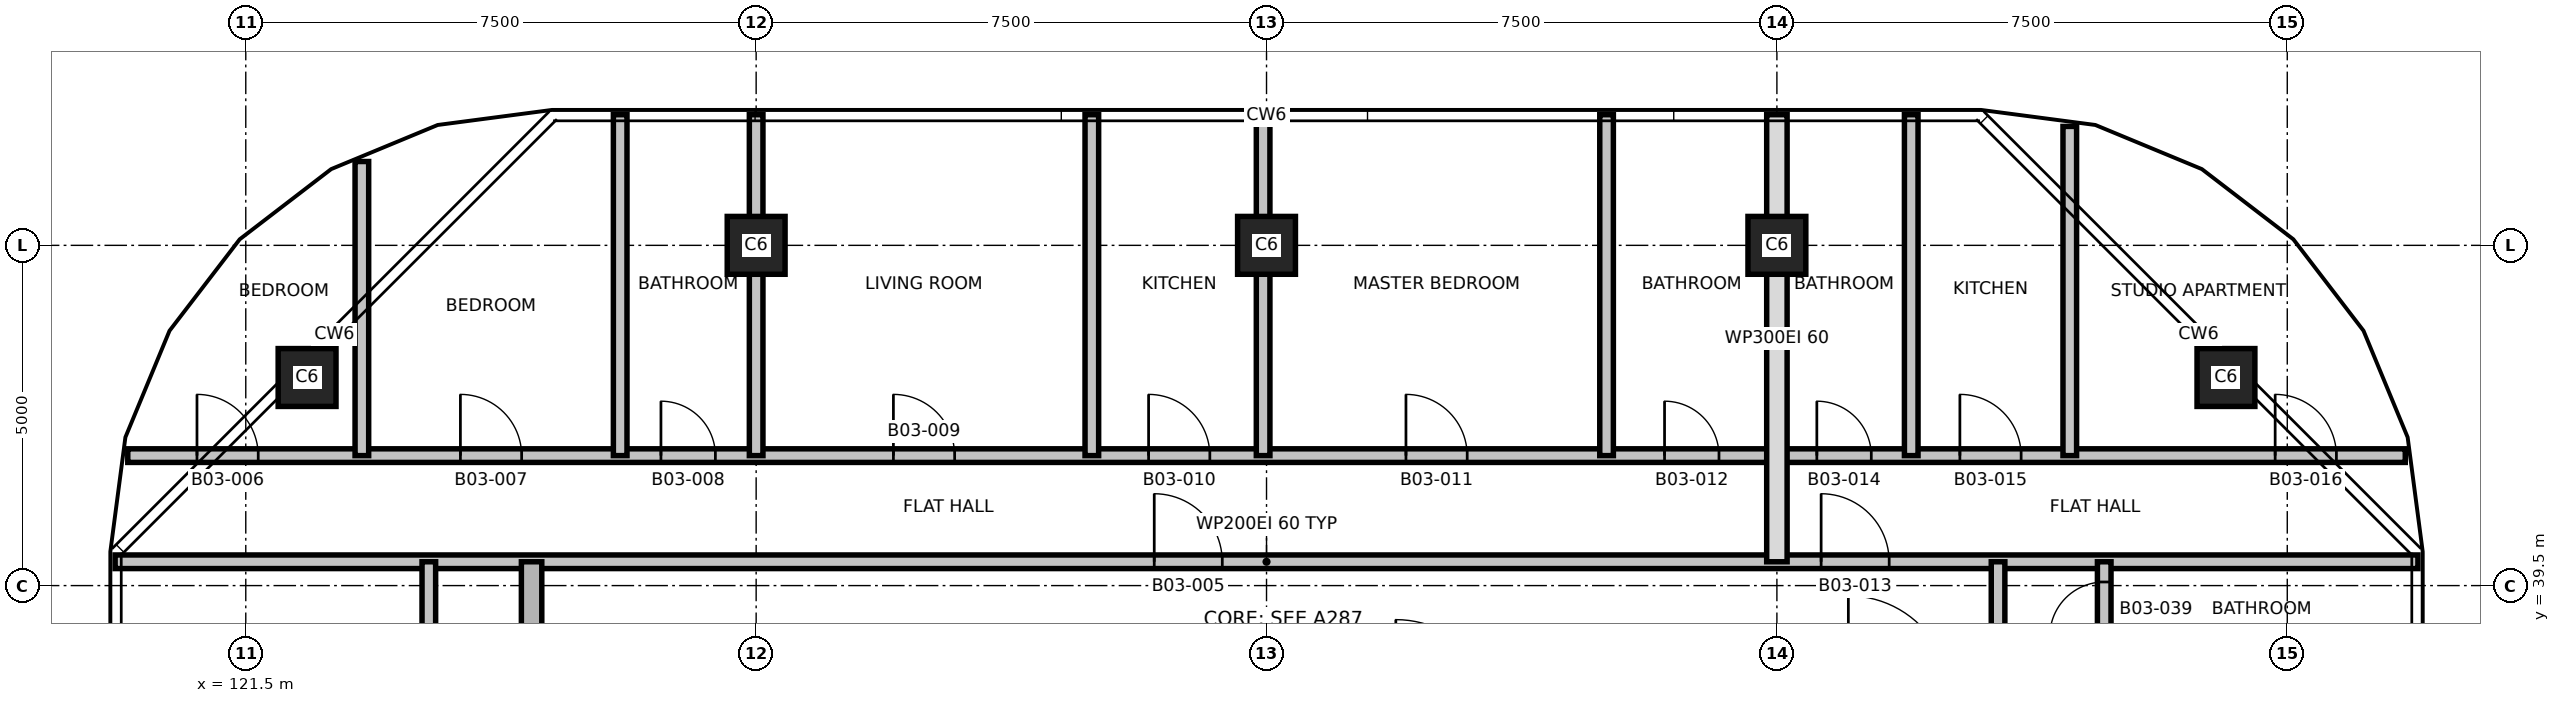
"""IFC4 building model, lengths in metres.
Left out: names, types, materials, properties, quantities, classifications, styles, units other than length and angle.
Written with IfcOpenShell. Run it as: python <this file> out.ifc"""

import sys

from ifc_helpers import new_model, si_unit, direction, frame, frame_2d, origin, origin_2d, place, context, subcontext, project, spatial, rectangle, extrude, element, fill, save


model = new_model("IFC4")
c1 = context("Model", 3, precision=1e-05, world=origin(), true_north=direction((0.0, 1.0)))
c2 = subcontext(c1, "Body", "Model", "MODEL_VIEW")
j1 = project(units=[si_unit("LENGTHUNIT", "METRE"), si_unit("PLANEANGLEUNIT", "RADIAN")], contexts=[c1])
p1 = place(None, origin())
s1 = spatial("IfcSite", under=j1, at=p1, CompositionType="ELEMENT")
p2 = place(p1, origin())
s2 = spatial("IfcBuilding", under=s1, at=p2, CompositionType="ELEMENT")
p3 = place(p2, frame((0.0, 0.0, 59.4)))
s3 = spatial("IfcBuildingStorey", under=s2, at=p3, CompositionType="ELEMENT", Elevation=59.4)
for number, where, z_axis, x_axis in (
    (1, (122.401, 42.558, 0.0), (0.0, 0.0, 1.0), (1.0, 0.0, 0.0)),
    (2, (150.599, 42.558, 0.0), (0.0, 0.0, 1.0), (1.0, 0.0, 0.0)),
    (3, (129.0, 44.5, 0.0), (0.0, 0.0, 1.0), (1.0, 0.0, 0.0)),
    (4, (136.5, 44.5, 0.0), (0.0, 0.0, 1.0), (1.0, 0.0, 0.0)),
    (5, (144.0, 44.5, 0.0), (0.0, 0.0, 1.0), (1.0, 0.0, 0.0)),
):
    element("IfcColumn", number, at=place(p3, frame(where, z_axis=z_axis, x_axis=x_axis)), inside=s3, PredefinedType="COLUMN", context=c2, shape_type="SweptSolid", body=[
        extrude(rectangle(XDim=0.85, YDim=0.85, at=origin_2d()), origin(), (0.0, 0.0, 1.0), 3.7),
    ])
p4 = place(p3, frame((119.58, 39.85, 0.0), z_axis=(0.0, 0.0, 1.0), x_axis=(1.0, 0.0, 0.0)))
e6 = element("IfcWall", 6, at=p4, inside=s3, PredefinedType="PARTITIONING", context=c2, shape_type="SweptSolid", body=[
    extrude(rectangle(XDim=33.84, YDim=0.2, at=frame_2d((16.92, 0.0))), origin(), (0.0, 0.0, 1.0), 3.4),
])
p5 = place(p4, frame((15.27, 0.0, 0.0)))
e7 = element("IfcOpeningElement", 7, at=p5, cuts=e6, PredefinedType="OPENING", context=c2, shape_type="SweptSolid", body=[
    extrude(rectangle(XDim=1.0, YDim=2.1, at=frame_2d((0.5, 1.05))), frame((0.0, 0.11, 0.0), z_axis=(0.0, -1.0, 0.0), x_axis=(1.0, 0.0, 0.0)), (0.0, 0.0, 1.0), 0.22),
])
p6 = place(p4, frame((25.07, 0.0, 0.0)))
e8 = element("IfcOpeningElement", 8, at=p6, cuts=e6, PredefinedType="OPENING", context=c2, shape_type="SweptSolid", body=[
    extrude(rectangle(XDim=1.0, YDim=2.1, at=frame_2d((0.5, 1.05))), frame((0.0, 0.11, 0.0), z_axis=(0.0, -1.0, 0.0), x_axis=(1.0, 0.0, 0.0)), (0.0, 0.0, 1.0), 0.22),
])
p7 = place(p3, frame((119.766, 41.41, 0.0), z_axis=(0.0, 0.0, 1.0), x_axis=(1.0, 0.0, 0.0)))
e9 = element("IfcWall", 9, at=p7, inside=s3, PredefinedType="PARTITIONING", context=c2, shape_type="SweptSolid", body=[
    extrude(rectangle(XDim=33.468, YDim=0.2, at=frame_2d((16.734, 0.0))), origin(), (0.0, 0.0, 1.0), 3.4),
])
p8 = place(p7, frame((1.017, 0.0, 0.0)))
e10 = element("IfcOpeningElement", 10, at=p8, cuts=e9, PredefinedType="OPENING", context=c2, shape_type="SweptSolid", body=[
    extrude(rectangle(XDim=0.9, YDim=2.1, at=frame_2d((0.45, 1.05))), frame((0.0, 0.11, 0.0), z_axis=(0.0, -1.0, 0.0), x_axis=(1.0, 0.0, 0.0)), (0.0, 0.0, 1.0), 0.22),
])
p9 = place(p7, frame((4.888, 0.0, 0.0)))
e11 = element("IfcOpeningElement", 11, at=p9, cuts=e9, PredefinedType="OPENING", context=c2, shape_type="SweptSolid", body=[
    extrude(rectangle(XDim=0.9, YDim=2.1, at=frame_2d((0.45, 1.05))), frame((0.0, 0.11, 0.0), z_axis=(0.0, -1.0, 0.0), x_axis=(1.0, 0.0, 0.0)), (0.0, 0.0, 1.0), 0.22),
])
p10 = place(p7, frame((7.835, 0.0, 0.0)))
e12 = element("IfcOpeningElement", 12, at=p10, cuts=e9, PredefinedType="OPENING", context=c2, shape_type="SweptSolid", body=[
    extrude(rectangle(XDim=0.8, YDim=2.1, at=frame_2d((0.4, 1.05))), frame((0.0, 0.11, 0.0), z_axis=(0.0, -1.0, 0.0), x_axis=(1.0, 0.0, 0.0)), (0.0, 0.0, 1.0), 0.22),
])
p11 = place(p7, frame((11.251, 0.0, 0.0)))
e13 = element("IfcOpeningElement", 13, at=p11, cuts=e9, PredefinedType="OPENING", context=c2, shape_type="SweptSolid", body=[
    extrude(rectangle(XDim=0.9, YDim=2.1, at=frame_2d((0.45, 1.05))), frame((0.0, 0.11, 0.0), z_axis=(0.0, -1.0, 0.0), x_axis=(1.0, 0.0, 0.0)), (0.0, 0.0, 1.0), 0.22),
])
p12 = place(p7, frame((15.001, 0.0, 0.0)))
e14 = element("IfcOpeningElement", 14, at=p12, cuts=e9, PredefinedType="OPENING", context=c2, shape_type="SweptSolid", body=[
    extrude(rectangle(XDim=0.9, YDim=2.1, at=frame_2d((0.45, 1.05))), frame((0.0, 0.11, 0.0), z_axis=(0.0, -1.0, 0.0), x_axis=(1.0, 0.0, 0.0)), (0.0, 0.0, 1.0), 0.22),
])
p13 = place(p7, frame((18.783, 0.0, 0.0)))
e15 = element("IfcOpeningElement", 15, at=p13, cuts=e9, PredefinedType="OPENING", context=c2, shape_type="SweptSolid", body=[
    extrude(rectangle(XDim=0.9, YDim=2.1, at=frame_2d((0.45, 1.05))), frame((0.0, 0.11, 0.0), z_axis=(0.0, -1.0, 0.0), x_axis=(1.0, 0.0, 0.0)), (0.0, 0.0, 1.0), 0.22),
])
p14 = place(p7, frame((22.583, 0.0, 0.0)))
e16 = element("IfcOpeningElement", 16, at=p14, cuts=e9, PredefinedType="OPENING", context=c2, shape_type="SweptSolid", body=[
    extrude(rectangle(XDim=0.8, YDim=2.1, at=frame_2d((0.4, 1.05))), frame((0.0, 0.11, 0.0), z_axis=(0.0, -1.0, 0.0), x_axis=(1.0, 0.0, 0.0)), (0.0, 0.0, 1.0), 0.22),
])
p15 = place(p7, frame((24.821, 0.0, 0.0)))
e17 = element("IfcOpeningElement", 17, at=p15, cuts=e9, PredefinedType="OPENING", context=c2, shape_type="SweptSolid", body=[
    extrude(rectangle(XDim=0.8, YDim=2.1, at=frame_2d((0.4, 1.05))), frame((0.0, 0.11, 0.0), z_axis=(0.0, -1.0, 0.0), x_axis=(1.0, 0.0, 0.0)), (0.0, 0.0, 1.0), 0.22),
])
p16 = place(p7, frame((26.923, 0.0, 0.0)))
e18 = element("IfcOpeningElement", 18, at=p16, cuts=e9, PredefinedType="OPENING", context=c2, shape_type="SweptSolid", body=[
    extrude(rectangle(XDim=0.9, YDim=2.1, at=frame_2d((0.45, 1.05))), frame((0.0, 0.11, 0.0), z_axis=(0.0, -1.0, 0.0), x_axis=(1.0, 0.0, 0.0)), (0.0, 0.0, 1.0), 0.22),
])
p17 = place(p7, frame((31.556, 0.0, 0.0)))
e19 = element("IfcOpeningElement", 19, at=p17, cuts=e9, PredefinedType="OPENING", context=c2, shape_type="SweptSolid", body=[
    extrude(rectangle(XDim=0.9, YDim=2.1, at=frame_2d((0.45, 1.05))), frame((0.0, 0.11, 0.0), z_axis=(0.0, -1.0, 0.0), x_axis=(1.0, 0.0, 0.0)), (0.0, 0.0, 1.0), 0.22),
])
p18 = place(p3, frame((123.206, 41.41, 0.0), z_axis=(0.0, 0.0, 1.0), x_axis=(0.0, 1.0, 0.0)))
e20 = element("IfcWall", 20, at=p18, inside=s3, PredefinedType="PARTITIONING", context=c2, shape_type="SweptSolid", body=[
    extrude(rectangle(XDim=4.322, YDim=0.2, at=frame_2d((2.161, 0.0))), origin(), (0.0, 0.0, 1.0), 3.4),
])
p19 = place(p3, frame((124.19, 22.15, 0.0), z_axis=(0.0, 0.0, 1.0), x_axis=(0.0, 1.0, 0.0)))
e21 = element("IfcWall", 21, at=p19, inside=s3, PredefinedType="PARTITIONING", context=c2, shape_type="SweptSolid", body=[
    extrude(rectangle(XDim=17.7, YDim=0.2, at=frame_2d((8.85, 0.0))), origin(), (0.0, 0.0, 1.0), 3.4),
])
p20 = place(p19, frame((1.028, 0.0, 0.0)))
e22 = element("IfcOpeningElement", 22, at=p20, cuts=e21, PredefinedType="OPENING", context=c2, shape_type="SweptSolid", body=[
    extrude(rectangle(XDim=0.9, YDim=2.1, at=frame_2d((0.45, 1.05))), frame((0.0, 0.11, 0.0), z_axis=(0.0, -1.0, 0.0), x_axis=(1.0, 0.0, 0.0)), (0.0, 0.0, 1.0), 0.22),
])
p21 = place(p19, frame((3.253, 0.0, 0.0)))
e23 = element("IfcOpeningElement", 23, at=p21, cuts=e21, PredefinedType="OPENING", context=c2, shape_type="SweptSolid", body=[
    extrude(rectangle(XDim=0.8, YDim=2.1, at=frame_2d((0.4, 1.05))), frame((0.0, 0.11, 0.0), z_axis=(0.0, -1.0, 0.0), x_axis=(1.0, 0.0, 0.0)), (0.0, 0.0, 1.0), 0.22),
])
p22 = place(p19, frame((6.867, 0.0, 0.0)))
e24 = element("IfcOpeningElement", 24, at=p22, cuts=e21, PredefinedType="OPENING", context=c2, shape_type="SweptSolid", body=[
    extrude(rectangle(XDim=0.9, YDim=2.1, at=frame_2d((0.45, 1.05))), frame((0.0, 0.11, 0.0), z_axis=(0.0, -1.0, 0.0), x_axis=(1.0, 0.0, 0.0)), (0.0, 0.0, 1.0), 0.22),
])
p23 = place(p19, frame((11.367, 0.0, 0.0)))
e25 = element("IfcOpeningElement", 25, at=p23, cuts=e21, PredefinedType="OPENING", context=c2, shape_type="SweptSolid", body=[
    extrude(rectangle(XDim=0.9, YDim=2.1, at=frame_2d((0.45, 1.05))), frame((0.0, 0.11, 0.0), z_axis=(0.0, -1.0, 0.0), x_axis=(1.0, 0.0, 0.0)), (0.0, 0.0, 1.0), 0.22),
])
p24 = place(p19, frame((15.075, 0.0, 0.0)))
e26 = element("IfcOpeningElement", 26, at=p24, cuts=e21, PredefinedType="OPENING", context=c2, shape_type="SweptSolid", body=[
    extrude(rectangle(XDim=0.9, YDim=2.1, at=frame_2d((0.45, 1.05))), frame((0.0, 0.11, 0.0), z_axis=(0.0, -1.0, 0.0), x_axis=(1.0, 0.0, 0.0)), (0.0, 0.0, 1.0), 0.22),
])
p25 = place(p3, frame((125.7, 22.15, 0.0), z_axis=(0.0, 0.0, 1.0), x_axis=(0.0, 1.0, 0.0)))
e27 = element("IfcWall", 27, at=p25, inside=s3, PredefinedType="SHEAR", context=c2, shape_type="SweptSolid", body=[
    extrude(rectangle(XDim=17.7, YDim=0.3, at=frame_2d((8.85, 0.0))), origin(), (0.0, 0.0, 1.0), 3.4),
])
p26 = place(p25, frame((2.7, 0.0, 0.0)))
e28 = element("IfcOpeningElement", 28, at=p26, cuts=e27, PredefinedType="OPENING", context=c2, shape_type="SweptSolid", body=[
    extrude(rectangle(XDim=1.0, YDim=2.1, at=frame_2d((0.5, 1.05))), frame((0.0, 0.16, 0.0), z_axis=(0.0, -1.0, 0.0), x_axis=(1.0, 0.0, 0.0)), (0.0, 0.0, 1.0), 0.32),
])
for number, where, z_axis, x_axis in (
    (29, (127.002, 41.41, 0.0), (0.0, 0.0, 1.0), (0.0, 1.0, 0.0)),
    (30, (129.0, 41.41, 0.0), (0.0, 0.0, 1.0), (0.0, 1.0, 0.0)),
    (31, (133.933, 41.41, 0.0), (0.0, 0.0, 1.0), (0.0, 1.0, 0.0)),
    (32, (136.45, 41.41, 0.0), (0.0, 0.0, 1.0), (0.0, 1.0, 0.0)),
    (33, (141.497, 41.41, 0.0), (0.0, 0.0, 1.0), (0.0, 1.0, 0.0)),
):
    element("IfcWall", number, at=place(p3, frame(where, z_axis=z_axis, x_axis=x_axis)), inside=s3, PredefinedType="PARTITIONING", context=c2, shape_type="SweptSolid", body=[
        extrude(rectangle(XDim=5.01, YDim=0.2, at=frame_2d((2.505, 0.0))), origin(), (0.0, 0.0, 1.0), 3.4),
    ])
p27 = place(p3, frame((144.0, 39.85, 0.0), z_axis=(0.0, 0.0, 1.0), x_axis=(0.0, 1.0, 0.0)))
e34 = element("IfcWall", 34, at=p27, inside=s3, PredefinedType="PARTITIONING", context=c2, shape_type="SweptSolid", body=[
    extrude(rectangle(XDim=6.57, YDim=0.3, at=frame_2d((3.285, 0.0))), origin(), (0.0, 0.0, 1.0), 3.4),
])
p28 = place(p3, frame((145.974, 41.41, 0.0), z_axis=(0.0, 0.0, 1.0), x_axis=(0.0, 1.0, 0.0)))
e35 = element("IfcWall", 35, at=p28, inside=s3, PredefinedType="PARTITIONING", context=c2, shape_type="SweptSolid", body=[
    extrude(rectangle(XDim=5.01, YDim=0.2, at=frame_2d((2.505, 0.0))), origin(), (0.0, 0.0, 1.0), 3.4),
])
p29 = place(p3, frame((147.25, 22.15, 0.0), z_axis=(0.0, 0.0, 1.0), x_axis=(0.0, 1.0, 0.0)))
e36 = element("IfcWall", 36, at=p29, inside=s3, PredefinedType="PARTITIONING", context=c2, shape_type="SweptSolid", body=[
    extrude(rectangle(XDim=17.7, YDim=0.2, at=frame_2d((8.85, 0.0))), origin(), (0.0, 0.0, 1.0), 3.4),
])
p30 = place(p29, frame((2.65, 0.0, 0.0)))
e37 = element("IfcOpeningElement", 37, at=p30, cuts=e36, PredefinedType="OPENING", context=c2, shape_type="SweptSolid", body=[
    extrude(rectangle(XDim=1.0, YDim=2.1, at=frame_2d((0.5, 1.05))), frame((0.0, 0.11, 0.0), z_axis=(0.0, -1.0, 0.0), x_axis=(1.0, 0.0, 0.0)), (0.0, 0.0, 1.0), 0.22),
])
p31 = place(p3, frame((148.304, 41.41, 0.0), z_axis=(0.0, 0.0, 1.0), x_axis=(0.0, 1.0, 0.0)))
e38 = element("IfcWall", 38, at=p31, inside=s3, PredefinedType="PARTITIONING", context=c2, shape_type="SweptSolid", body=[
    extrude(rectangle(XDim=4.838, YDim=0.2, at=frame_2d((2.419, 0.0))), origin(), (0.0, 0.0, 1.0), 3.4),
])
p32 = place(p3, frame((148.81, 22.15, 0.0), z_axis=(0.0, 0.0, 1.0), x_axis=(0.0, 1.0, 0.0)))
e39 = element("IfcWall", 39, at=p32, inside=s3, PredefinedType="PARTITIONING", context=c2, shape_type="SweptSolid", body=[
    extrude(rectangle(XDim=17.7, YDim=0.2, at=frame_2d((8.85, 0.0))), origin(), (0.0, 0.0, 1.0), 3.4),
])
p33 = place(p32, frame((1.725, 0.0, 0.0)))
e40 = element("IfcOpeningElement", 40, at=p33, cuts=e39, PredefinedType="OPENING", context=c2, shape_type="SweptSolid", body=[
    extrude(rectangle(XDim=0.9, YDim=2.1, at=frame_2d((0.45, 1.05))), frame((0.0, 0.11, 0.0), z_axis=(0.0, -1.0, 0.0), x_axis=(1.0, 0.0, 0.0)), (0.0, 0.0, 1.0), 0.22),
])
p34 = place(p32, frame((6.867, 0.0, 0.0)))
e41 = element("IfcOpeningElement", 41, at=p34, cuts=e39, PredefinedType="OPENING", context=c2, shape_type="SweptSolid", body=[
    extrude(rectangle(XDim=0.9, YDim=2.1, at=frame_2d((0.45, 1.05))), frame((0.0, 0.11, 0.0), z_axis=(0.0, -1.0, 0.0), x_axis=(1.0, 0.0, 0.0)), (0.0, 0.0, 1.0), 0.22),
])
p35 = place(p32, frame((11.367, 0.0, 0.0)))
e42 = element("IfcOpeningElement", 42, at=p35, cuts=e39, PredefinedType="OPENING", context=c2, shape_type="SweptSolid", body=[
    extrude(rectangle(XDim=0.9, YDim=2.1, at=frame_2d((0.45, 1.05))), frame((0.0, 0.11, 0.0), z_axis=(0.0, -1.0, 0.0), x_axis=(1.0, 0.0, 0.0)), (0.0, 0.0, 1.0), 0.22),
])
p36 = place(p32, frame((14.378, 0.0, 0.0)))
e43 = element("IfcOpeningElement", 43, at=p36, cuts=e39, PredefinedType="OPENING", context=c2, shape_type="SweptSolid", body=[
    extrude(rectangle(XDim=0.9, YDim=2.1, at=frame_2d((0.45, 1.05))), frame((0.0, 0.11, 0.0), z_axis=(0.0, -1.0, 0.0), x_axis=(1.0, 0.0, 0.0)), (0.0, 0.0, 1.0), 0.22),
])
p37 = place(p32, frame((16.603, 0.0, 0.0)))
e44 = element("IfcOpeningElement", 44, at=p37, cuts=e39, PredefinedType="OPENING", context=c2, shape_type="SweptSolid", body=[
    extrude(rectangle(XDim=0.8, YDim=2.1, at=frame_2d((0.4, 1.05))), frame((0.0, 0.11, 0.0), z_axis=(0.0, -1.0, 0.0), x_axis=(1.0, 0.0, 0.0)), (0.0, 0.0, 1.0), 0.22),
])
p38 = place(p5, origin())
e45 = element("IfcDoor", 45, at=p38, inside=s3, OperationType="SINGLE_SWING_LEFT", PredefinedType="DOOR", context=c2, shape_type="SweptSolid", body=[
    extrude(rectangle(XDim=1.0, YDim=2.1, at=frame_2d((0.5, 1.05))), frame((0.0, 0.025, 0.0), z_axis=(0.0, -1.0, 0.0), x_axis=(1.0, 0.0, 0.0)), (0.0, 0.0, 1.0), 0.05),
])
fill(e7, e45)
p39 = place(p8, origin())
e46 = element("IfcDoor", 46, at=p39, inside=s3, OperationType="SINGLE_SWING_RIGHT", PredefinedType="DOOR", context=c2, shape_type="SweptSolid", body=[
    extrude(rectangle(XDim=0.9, YDim=2.1, at=frame_2d((0.45, 1.05))), frame((0.0, 0.025, 0.0), z_axis=(0.0, -1.0, 0.0), x_axis=(1.0, 0.0, 0.0)), (0.0, 0.0, 1.0), 0.05),
])
fill(e10, e46)
p40 = place(p9, origin())
e47 = element("IfcDoor", 47, at=p40, inside=s3, OperationType="SINGLE_SWING_LEFT", PredefinedType="DOOR", context=c2, shape_type="SweptSolid", body=[
    extrude(rectangle(XDim=0.9, YDim=2.1, at=frame_2d((0.45, 1.05))), frame((0.0, 0.025, 0.0), z_axis=(0.0, -1.0, 0.0), x_axis=(1.0, 0.0, 0.0)), (0.0, 0.0, 1.0), 0.05),
])
fill(e11, e47)
p41 = place(p10, origin())
e48 = element("IfcDoor", 48, at=p41, inside=s3, OperationType="SINGLE_SWING_RIGHT", PredefinedType="DOOR", context=c2, shape_type="SweptSolid", body=[
    extrude(rectangle(XDim=0.8, YDim=2.1, at=frame_2d((0.4, 1.05))), frame((0.0, 0.025, 0.0), z_axis=(0.0, -1.0, 0.0), x_axis=(1.0, 0.0, 0.0)), (0.0, 0.0, 1.0), 0.05),
])
fill(e12, e48)
p42 = place(p11, origin())
e49 = element("IfcDoor", 49, at=p42, inside=s3, OperationType="SINGLE_SWING_LEFT", PredefinedType="DOOR", context=c2, shape_type="SweptSolid", body=[
    extrude(rectangle(XDim=0.9, YDim=2.1, at=frame_2d((0.45, 1.05))), frame((0.0, 0.025, 0.0), z_axis=(0.0, -1.0, 0.0), x_axis=(1.0, 0.0, 0.0)), (0.0, 0.0, 1.0), 0.05),
])
fill(e13, e49)
p43 = place(p12, origin())
e50 = element("IfcDoor", 50, at=p43, inside=s3, OperationType="SINGLE_SWING_RIGHT", PredefinedType="DOOR", context=c2, shape_type="SweptSolid", body=[
    extrude(rectangle(XDim=0.9, YDim=2.1, at=frame_2d((0.45, 1.05))), frame((0.0, 0.025, 0.0), z_axis=(0.0, -1.0, 0.0), x_axis=(1.0, 0.0, 0.0)), (0.0, 0.0, 1.0), 0.05),
])
fill(e14, e50)
p44 = place(p13, origin())
e51 = element("IfcDoor", 51, at=p44, inside=s3, OperationType="SINGLE_SWING_LEFT", PredefinedType="DOOR", context=c2, shape_type="SweptSolid", body=[
    extrude(rectangle(XDim=0.9, YDim=2.1, at=frame_2d((0.45, 1.05))), frame((0.0, 0.025, 0.0), z_axis=(0.0, -1.0, 0.0), x_axis=(1.0, 0.0, 0.0)), (0.0, 0.0, 1.0), 0.05),
])
fill(e15, e51)
p45 = place(p14, origin())
e52 = element("IfcDoor", 52, at=p45, inside=s3, OperationType="SINGLE_SWING_RIGHT", PredefinedType="DOOR", context=c2, shape_type="SweptSolid", body=[
    extrude(rectangle(XDim=0.8, YDim=2.1, at=frame_2d((0.4, 1.05))), frame((0.0, 0.025, 0.0), z_axis=(0.0, -1.0, 0.0), x_axis=(1.0, 0.0, 0.0)), (0.0, 0.0, 1.0), 0.05),
])
fill(e16, e52)
p46 = place(p6, origin())
e53 = element("IfcDoor", 53, at=p46, inside=s3, OperationType="SINGLE_SWING_LEFT", PredefinedType="DOOR", context=c2, shape_type="SweptSolid", body=[
    extrude(rectangle(XDim=1.0, YDim=2.1, at=frame_2d((0.5, 1.05))), frame((0.0, 0.025, 0.0), z_axis=(0.0, -1.0, 0.0), x_axis=(1.0, 0.0, 0.0)), (0.0, 0.0, 1.0), 0.05),
])
fill(e8, e53)
p47 = place(p15, origin())
e54 = element("IfcDoor", 54, at=p47, inside=s3, OperationType="SINGLE_SWING_RIGHT", PredefinedType="DOOR", context=c2, shape_type="SweptSolid", body=[
    extrude(rectangle(XDim=0.8, YDim=2.1, at=frame_2d((0.4, 1.05))), frame((0.0, 0.025, 0.0), z_axis=(0.0, -1.0, 0.0), x_axis=(1.0, 0.0, 0.0)), (0.0, 0.0, 1.0), 0.05),
])
fill(e17, e54)
p48 = place(p16, origin())
e55 = element("IfcDoor", 55, at=p48, inside=s3, OperationType="SINGLE_SWING_LEFT", PredefinedType="DOOR", context=c2, shape_type="SweptSolid", body=[
    extrude(rectangle(XDim=0.9, YDim=2.1, at=frame_2d((0.45, 1.05))), frame((0.0, 0.025, 0.0), z_axis=(0.0, -1.0, 0.0), x_axis=(1.0, 0.0, 0.0)), (0.0, 0.0, 1.0), 0.05),
])
fill(e18, e55)
p49 = place(p17, origin())
e56 = element("IfcDoor", 56, at=p49, inside=s3, OperationType="SINGLE_SWING_RIGHT", PredefinedType="DOOR", context=c2, shape_type="SweptSolid", body=[
    extrude(rectangle(XDim=0.9, YDim=2.1, at=frame_2d((0.45, 1.05))), frame((0.0, 0.025, 0.0), z_axis=(0.0, -1.0, 0.0), x_axis=(1.0, 0.0, 0.0)), (0.0, 0.0, 1.0), 0.05),
])
fill(e19, e56)
p50 = place(p37, origin())
e57 = element("IfcDoor", 57, at=p50, inside=s3, OperationType="SINGLE_SWING_LEFT", PredefinedType="DOOR", context=c2, shape_type="SweptSolid", body=[
    extrude(rectangle(XDim=0.8, YDim=2.1, at=frame_2d((0.4, 1.05))), frame((0.0, 0.025, 0.0), z_axis=(0.0, -1.0, 0.0), x_axis=(1.0, 0.0, 0.0)), (0.0, 0.0, 1.0), 0.05),
])
fill(e44, e57)
save(model, sys.argv[1])
